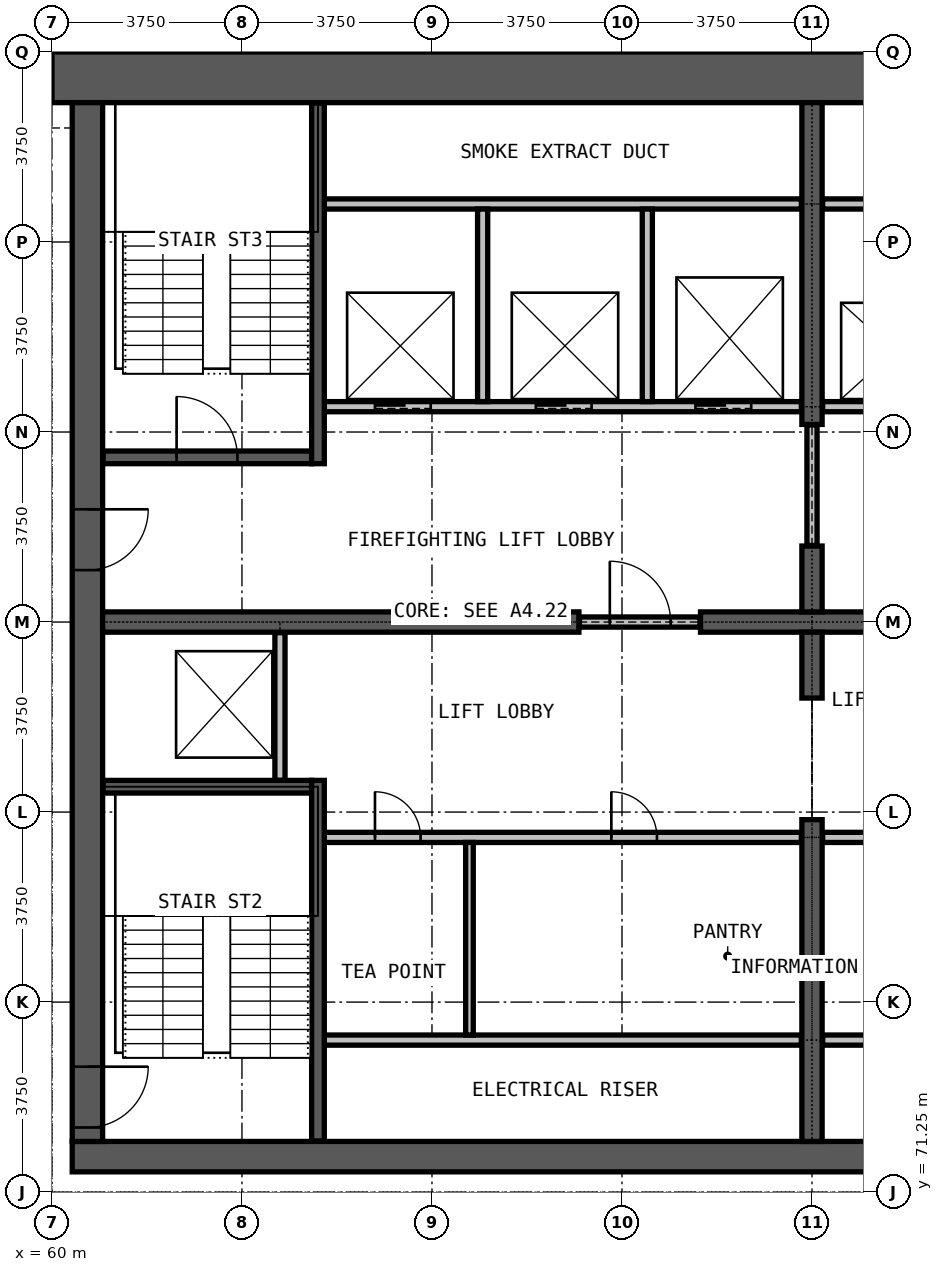
"""IFC4 building model, lengths in metres.
Left out: names, types, materials, properties, quantities, classifications, styles, units other than length and angle.
Written with IfcOpenShell. Run it as: python <this file> out.ifc"""

import sys

from ifc_helpers import new_model, si_unit, direction, frame, frame_2d, origin, place, context, subcontext, project, spatial, rectangle, extrude, element, fill, save


model = new_model("IFC4")
c1 = context("Model", 3, precision=1e-05, world=origin(), true_north=direction((0.0, 1.0)))
c2 = subcontext(c1, "Body", "Model", "MODEL_VIEW")
j1 = project(units=[si_unit("LENGTHUNIT", "METRE"), si_unit("PLANEANGLEUNIT", "RADIAN")], contexts=[c1])
p1 = place(None, origin())
s1 = spatial("IfcSite", under=j1, at=p1, CompositionType="ELEMENT")
p2 = place(p1, origin())
s2 = spatial("IfcBuilding", under=s1, at=p2, CompositionType="ELEMENT")
p3 = place(p2, frame((0.0, 0.0, 228.3)))
s3 = spatial("IfcBuildingStorey", under=s2, at=p3, CompositionType="ELEMENT", Elevation=228.3)
p4 = place(p3, frame((60.4, 71.95, 0.0), z_axis=(0.0, 0.0, 1.0), x_axis=(1.0, 0.0, 0.0)))
e1 = element("IfcWall", 1, at=p4, inside=s3, PredefinedType="SHEAR", context=c2, shape_type="SweptSolid", body=[
    extrude(rectangle(XDim=29.2, YDim=0.6, at=frame_2d((14.6, 0.0))), origin(), (0.0, 0.0, 1.0), 3.6),
])
p5 = place(p3, frame((90.0, 93.25, 0.0), z_axis=(0.0, 0.0, 1.0), x_axis=(-1.0, 0.0, 0.0)))
e2 = element("IfcWall", 2, at=p5, inside=s3, PredefinedType="SHEAR", context=c2, shape_type="SweptSolid", body=[
    extrude(rectangle(XDim=30.0, YDim=1.0, at=frame_2d((15.0, 0.0))), origin(), (0.0, 0.0, 1.0), 3.6),
])
p6 = place(p3, frame((60.7, 92.75, 0.0), z_axis=(0.0, 0.0, 1.0), x_axis=(0.0, -1.0, 0.0)))
e3 = element("IfcWall", 3, at=p6, inside=s3, PredefinedType="SHEAR", context=c2, shape_type="SweptSolid", body=[
    extrude(rectangle(XDim=20.5, YDim=0.6, at=frame_2d((10.25, 0.0))), origin(), (0.0, 0.0, 1.0), 3.6),
])
p7 = place(p6, frame((19.025, 0.0, 0.0)))
e4 = element("IfcOpeningElement", 4, at=p7, cuts=e3, PredefinedType="OPENING", context=c2, shape_type="SweptSolid", body=[
    extrude(rectangle(XDim=1.2, YDim=2.2, at=frame_2d((0.6, 1.1))), frame((0.0, 0.31, 0.0), z_axis=(0.0, -1.0, 0.0), x_axis=(1.0, 0.0, 0.0)), (0.0, 0.0, 1.0), 0.62),
])
p8 = place(p6, frame((8.025, 0.0, 0.0)))
e5 = element("IfcOpeningElement", 5, at=p8, cuts=e3, PredefinedType="OPENING", context=c2, shape_type="SweptSolid", body=[
    extrude(rectangle(XDim=1.2, YDim=2.2, at=frame_2d((0.6, 1.1))), frame((0.0, 0.31, 0.0), z_axis=(0.0, -1.0, 0.0), x_axis=(1.0, 0.0, 0.0)), (0.0, 0.0, 1.0), 0.62),
])
p9 = place(p3, frame((61.0, 82.5, 0.0), z_axis=(0.0, 0.0, 1.0), x_axis=(1.0, 0.0, 0.0)))
e6 = element("IfcWall", 6, at=p9, inside=s3, PredefinedType="SHEAR", context=c2, shape_type="SweptSolid", body=[
    extrude(rectangle(XDim=9.4, YDim=0.4, at=frame_2d((4.7, 0.0))), origin(), (0.0, 0.0, 1.0), 3.6),
])
p10 = place(p3, frame((72.8, 82.5, 0.0), z_axis=(0.0, 0.0, 1.0), x_axis=(1.0, 0.0, 0.0)))
e7 = element("IfcWall", 7, at=p10, inside=s3, PredefinedType="SHEAR", context=c2, shape_type="SweptSolid", body=[
    extrude(rectangle(XDim=4.4, YDim=0.4, at=frame_2d((2.2, 0.0))), origin(), (0.0, 0.0, 1.0), 3.6),
])
p11 = place(p3, frame((75.0, 72.25, 0.0), z_axis=(0.0, 0.0, 1.0), x_axis=(0.0, 1.0, 0.0)))
e8 = element("IfcWall", 8, at=p11, inside=s3, PredefinedType="SHEAR", context=c2, shape_type="SweptSolid", body=[
    extrude(rectangle(XDim=6.35, YDim=0.4, at=frame_2d((3.175, 0.0))), origin(), (0.0, 0.0, 1.0), 3.6),
])
for number, where, z_axis, x_axis in (
    (9, (75.0, 81.0, 0.0), (0.0, 0.0, 1.0), (0.0, 1.0, 0.0)),
    (10, (75.0, 82.7, 0.0), (0.0, 0.0, 1.0), (0.0, 1.0, 0.0)),
):
    element("IfcWall", number, at=place(p3, frame(where, z_axis=z_axis, x_axis=x_axis)), inside=s3, PredefinedType="SHEAR", context=c2, shape_type="SweptSolid", body=[
        extrude(rectangle(XDim=1.3, YDim=0.4, at=frame_2d((0.65, 0.0))), origin(), (0.0, 0.0, 1.0), 3.6),
    ])
p12 = place(p3, frame((75.0, 86.4, 0.0), z_axis=(0.0, 0.0, 1.0), x_axis=(0.0, 1.0, 0.0)))
e11 = element("IfcWall", 11, at=p12, inside=s3, PredefinedType="SHEAR", context=c2, shape_type="SweptSolid", body=[
    extrude(rectangle(XDim=6.35, YDim=0.4, at=frame_2d((3.175, 0.0))), origin(), (0.0, 0.0, 1.0), 3.6),
])
for number, where, z_axis, x_axis in (
    (12, (65.375, 74.25, 0.0), (0.0, 0.0, 1.0), (1.0, 0.0, 0.0)),
    (13, (75.21, 74.25, 0.0), (0.0, 0.0, 1.0), (1.0, 0.0, 0.0)),
):
    element("IfcWall", number, at=place(p3, frame(where, z_axis=z_axis, x_axis=x_axis)), inside=s3, PredefinedType="PARTITIONING", context=c2, shape_type="SweptSolid", body=[
        extrude(rectangle(XDim=9.415, YDim=0.2, at=frame_2d((4.708, 0.0))), origin(), (0.0, 0.0, 1.0), 3.3),
    ])
p13 = place(p3, frame((65.375, 78.25, 0.0), z_axis=(0.0, 0.0, 1.0), x_axis=(1.0, 0.0, 0.0)))
e14 = element("IfcWall", 14, at=p13, inside=s3, PredefinedType="PARTITIONING", context=c2, shape_type="SweptSolid", body=[
    extrude(rectangle(XDim=9.415, YDim=0.2, at=frame_2d((4.708, 0.0))), origin(), (0.0, 0.0, 1.0), 3.3),
])
p14 = place(p13, frame((1.0, 0.0, 0.0)))
e15 = element("IfcOpeningElement", 15, at=p14, cuts=e14, PredefinedType="OPENING", context=c2, shape_type="SweptSolid", body=[
    extrude(rectangle(XDim=0.9, YDim=2.2, at=frame_2d((0.45, 1.1))), frame((0.0, 0.11, 0.0), z_axis=(0.0, -1.0, 0.0), x_axis=(1.0, 0.0, 0.0)), (0.0, 0.0, 1.0), 0.22),
])
p15 = place(p13, frame((5.665, 0.0, 0.0)))
e16 = element("IfcOpeningElement", 16, at=p15, cuts=e14, PredefinedType="OPENING", context=c2, shape_type="SweptSolid", body=[
    extrude(rectangle(XDim=0.9, YDim=2.2, at=frame_2d((0.45, 1.1))), frame((0.0, 0.11, 0.0), z_axis=(0.0, -1.0, 0.0), x_axis=(1.0, 0.0, 0.0)), (0.0, 0.0, 1.0), 0.22),
])
p16 = place(p3, frame((75.21, 78.25, 0.0), z_axis=(0.0, 0.0, 1.0), x_axis=(1.0, 0.0, 0.0)))
e17 = element("IfcWall", 17, at=p16, inside=s3, PredefinedType="PARTITIONING", context=c2, shape_type="SweptSolid", body=[
    extrude(rectangle(XDim=9.415, YDim=0.2, at=frame_2d((4.708, 0.0))), origin(), (0.0, 0.0, 1.0), 3.3),
])
p17 = place(p16, frame((1.9, 0.0, 0.0)))
e18 = element("IfcOpeningElement", 18, at=p17, cuts=e17, PredefinedType="OPENING", context=c2, shape_type="SweptSolid", body=[
    extrude(rectangle(XDim=0.9, YDim=2.2, at=frame_2d((0.45, 1.1))), frame((0.0, 0.11, 0.0), z_axis=(0.0, -1.0, 0.0), x_axis=(1.0, 0.0, 0.0)), (0.0, 0.0, 1.0), 0.22),
])
p18 = place(p16, frame((6.565, 0.0, 0.0)))
e19 = element("IfcOpeningElement", 19, at=p18, cuts=e17, PredefinedType="OPENING", context=c2, shape_type="SweptSolid", body=[
    extrude(rectangle(XDim=0.9, YDim=2.2, at=frame_2d((0.45, 1.1))), frame((0.0, 0.11, 0.0), z_axis=(0.0, -1.0, 0.0), x_axis=(1.0, 0.0, 0.0)), (0.0, 0.0, 1.0), 0.22),
])
p19 = place(p3, frame((70.41, 82.5, 0.0), z_axis=(0.0, 0.0, 1.0), x_axis=(1.0, 0.0, 0.0)))
e20 = element("IfcWall", 20, at=p19, inside=s3, PredefinedType="PARTITIONING", context=c2, shape_type="SweptSolid", body=[
    extrude(rectangle(XDim=2.38, YDim=0.2, at=frame_2d((1.19, 0.0))), origin(), (0.0, 0.0, 1.0), 2.4),
])
p20 = place(p19, frame((0.6, 0.0, 0.0)))
e21 = element("IfcOpeningElement", 21, at=p20, cuts=e20, PredefinedType="OPENING", context=c2, shape_type="SweptSolid", body=[
    extrude(rectangle(XDim=1.2, YDim=2.2, at=frame_2d((0.6, 1.1))), frame((0.0, 0.11, 0.0), z_axis=(0.0, -1.0, 0.0), x_axis=(1.0, 0.0, 0.0)), (0.0, 0.0, 1.0), 0.22),
])
p21 = place(p3, frame((75.0, 84.01, 0.0), z_axis=(0.0, 0.0, 1.0), x_axis=(0.0, 1.0, 0.0)))
e22 = element("IfcWall", 22, at=p21, inside=s3, PredefinedType="PARTITIONING", context=c2, shape_type="SweptSolid", body=[
    extrude(rectangle(XDim=2.38, YDim=0.2, at=frame_2d((1.19, 0.0))), origin(), (0.0, 0.0, 1.0), 2.4),
])
p22 = place(p3, frame((68.24, 74.35, 0.0), z_axis=(0.0, 0.0, 1.0), x_axis=(0.0, 1.0, 0.0)))
e23 = element("IfcWall", 23, at=p22, inside=s3, PredefinedType="PARTITIONING", context=c2, shape_type="SweptSolid", body=[
    extrude(rectangle(XDim=3.8, YDim=0.15, at=frame_2d((1.9, 0.0))), origin(), (0.0, 0.0, 1.0), 3.3),
])
p23 = place(p3, frame((65.375, 86.75, 0.0), z_axis=(0.0, 0.0, 1.0), x_axis=(1.0, 0.0, 0.0)))
e24 = element("IfcWall", 24, at=p23, inside=s3, PredefinedType="PARTITIONING", context=c2, shape_type="SweptSolid", body=[
    extrude(rectangle(XDim=9.415, YDim=0.2, at=frame_2d((4.708, 0.0))), origin(), (0.0, 0.0, 1.0), 3.3),
])
p24 = place(p23, frame((1.0, 0.0, 0.0)))
e25 = element("IfcOpeningElement", 25, at=p24, cuts=e24, PredefinedType="OPENING", context=c2, shape_type="SweptSolid", body=[
    extrude(rectangle(XDim=1.1, YDim=2.2, at=frame_2d((0.55, 1.1))), frame((0.0, 0.11, 0.0), z_axis=(0.0, -1.0, 0.0), x_axis=(1.0, 0.0, 0.0)), (0.0, 0.0, 1.0), 0.22),
])
p25 = place(p23, frame((4.175, 0.0, 0.0)))
e26 = element("IfcOpeningElement", 26, at=p25, cuts=e24, PredefinedType="OPENING", context=c2, shape_type="SweptSolid", body=[
    extrude(rectangle(XDim=1.1, YDim=2.2, at=frame_2d((0.55, 1.1))), frame((0.0, 0.11, 0.0), z_axis=(0.0, -1.0, 0.0), x_axis=(1.0, 0.0, 0.0)), (0.0, 0.0, 1.0), 0.22),
])
p26 = place(p23, frame((7.325, 0.0, 0.0)))
e27 = element("IfcOpeningElement", 27, at=p26, cuts=e24, PredefinedType="OPENING", context=c2, shape_type="SweptSolid", body=[
    extrude(rectangle(XDim=1.1, YDim=2.2, at=frame_2d((0.55, 1.1))), frame((0.0, 0.11, 0.0), z_axis=(0.0, -1.0, 0.0), x_axis=(1.0, 0.0, 0.0)), (0.0, 0.0, 1.0), 0.22),
])
p27 = place(p3, frame((75.21, 86.75, 0.0), z_axis=(0.0, 0.0, 1.0), x_axis=(1.0, 0.0, 0.0)))
e28 = element("IfcWall", 28, at=p27, inside=s3, PredefinedType="PARTITIONING", context=c2, shape_type="SweptSolid", body=[
    extrude(rectangle(XDim=9.415, YDim=0.2, at=frame_2d((4.708, 0.0))), origin(), (0.0, 0.0, 1.0), 3.3),
])
p28 = place(p27, frame((0.95, 0.0, 0.0)))
e29 = element("IfcOpeningElement", 29, at=p28, cuts=e28, PredefinedType="OPENING", context=c2, shape_type="SweptSolid", body=[
    extrude(rectangle(XDim=1.1, YDim=2.2, at=frame_2d((0.55, 1.1))), frame((0.0, 0.11, 0.0), z_axis=(0.0, -1.0, 0.0), x_axis=(1.0, 0.0, 0.0)), (0.0, 0.0, 1.0), 0.22),
])
p29 = place(p27, frame((4.14, 0.0, 0.0)))
e30 = element("IfcOpeningElement", 30, at=p29, cuts=e28, PredefinedType="OPENING", context=c2, shape_type="SweptSolid", body=[
    extrude(rectangle(XDim=1.1, YDim=2.2, at=frame_2d((0.55, 1.1))), frame((0.0, 0.11, 0.0), z_axis=(0.0, -1.0, 0.0), x_axis=(1.0, 0.0, 0.0)), (0.0, 0.0, 1.0), 0.22),
])
p30 = place(p27, frame((7.29, 0.0, 0.0)))
e31 = element("IfcOpeningElement", 31, at=p30, cuts=e28, PredefinedType="OPENING", context=c2, shape_type="SweptSolid", body=[
    extrude(rectangle(XDim=1.1, YDim=2.2, at=frame_2d((0.55, 1.1))), frame((0.0, 0.11, 0.0), z_axis=(0.0, -1.0, 0.0), x_axis=(1.0, 0.0, 0.0)), (0.0, 0.0, 1.0), 0.22),
])
for number, where, z_axis, x_axis in (
    (32, (65.375, 90.75, 0.0), (0.0, 0.0, 1.0), (1.0, 0.0, 0.0)),
    (33, (75.21, 90.75, 0.0), (0.0, 0.0, 1.0), (1.0, 0.0, 0.0)),
):
    element("IfcWall", number, at=place(p3, frame(where, z_axis=z_axis, x_axis=x_axis)), inside=s3, PredefinedType="PARTITIONING", context=c2, shape_type="SweptSolid", body=[
        extrude(rectangle(XDim=9.415, YDim=0.2, at=frame_2d((4.708, 0.0))), origin(), (0.0, 0.0, 1.0), 3.3),
    ])
p31 = place(p3, frame((64.5, 79.375, 0.0), z_axis=(0.0, 0.0, 1.0), x_axis=(0.0, 1.0, 0.0)))
e34 = element("IfcWall", 34, at=p31, inside=s3, PredefinedType="PARTITIONING", context=c2, shape_type="SweptSolid", body=[
    extrude(rectangle(XDim=2.915, YDim=0.2, at=frame_2d((1.458, 0.0))), origin(), (0.0, 0.0, 1.0), 3.3),
])
for number, where, z_axis, x_axis in (
    (35, (68.5, 86.85, 0.0), (0.0, 0.0, 1.0), (0.0, 1.0, 0.0)),
    (36, (71.75, 86.85, 0.0), (0.0, 0.0, 1.0), (0.0, 1.0, 0.0)),
):
    element("IfcWall", number, at=place(p3, frame(where, z_axis=z_axis, x_axis=x_axis)), inside=s3, PredefinedType="PARTITIONING", context=c2, shape_type="SweptSolid", body=[
        extrude(rectangle(XDim=3.8, YDim=0.2, at=frame_2d((1.9, 0.0))), origin(), (0.0, 0.0, 1.0), 3.3),
    ])
p32 = place(p3, frame((61.01, 79.25, 0.0), z_axis=(0.0, 0.0, 1.0), x_axis=(1.0, 0.0, 0.0)))
e37 = element("IfcWall", 37, at=p32, inside=s3, PredefinedType="PARTITIONING", context=c2, shape_type="SweptSolid", body=[
    extrude(rectangle(XDim=4.115, YDim=0.25, at=frame_2d((2.058, 0.0))), origin(), (0.0, 0.0, 1.0), 3.3),
])
p33 = place(p3, frame((61.01, 85.75, 0.0), z_axis=(0.0, 0.0, 1.0), x_axis=(1.0, 0.0, 0.0)))
e38 = element("IfcWall", 38, at=p33, inside=s3, PredefinedType="PARTITIONING", context=c2, shape_type="SweptSolid", body=[
    extrude(rectangle(XDim=4.115, YDim=0.25, at=frame_2d((2.058, 0.0))), origin(), (0.0, 0.0, 1.0), 3.3),
])
p34 = place(p33, frame((1.45, 0.0, 0.0)))
e39 = element("IfcOpeningElement", 39, at=p34, cuts=e38, PredefinedType="OPENING", context=c2, shape_type="SweptSolid", body=[
    extrude(rectangle(XDim=1.2, YDim=2.2, at=frame_2d((0.6, 1.1))), frame((0.0, 0.135, 0.0), z_axis=(0.0, -1.0, 0.0), x_axis=(1.0, 0.0, 0.0)), (0.0, 0.0, 1.0), 0.27),
])
for number, where, z_axis, x_axis in (
    (40, (65.25, 72.26, 0.0), (0.0, 0.0, 1.0), (0.0, 1.0, 0.0)),
    (41, (65.25, 85.625, 0.0), (0.0, 0.0, 1.0), (0.0, 1.0, 0.0)),
):
    element("IfcWall", number, at=place(p3, frame(where, z_axis=z_axis, x_axis=x_axis)), inside=s3, PredefinedType="PARTITIONING", context=c2, shape_type="SweptSolid", body=[
        extrude(rectangle(XDim=7.115, YDim=0.25, at=frame_2d((3.558, 0.0))), origin(), (0.0, 0.0, 1.0), 3.3),
    ])
p35 = place(p24, origin())
e42 = element("IfcDoor", 42, at=p35, inside=s3, OperationType="DOUBLE_DOOR_SLIDING", PredefinedType="DOOR", context=c2, shape_type="SweptSolid", body=[
    extrude(rectangle(XDim=1.1, YDim=2.2, at=frame_2d((0.55, 1.1))), frame((0.0, 0.025, 0.0), z_axis=(0.0, -1.0, 0.0), x_axis=(1.0, 0.0, 0.0)), (0.0, 0.0, 1.0), 0.05),
])
fill(e25, e42)
p36 = place(p25, origin())
e43 = element("IfcDoor", 43, at=p36, inside=s3, OperationType="DOUBLE_DOOR_SLIDING", PredefinedType="DOOR", context=c2, shape_type="SweptSolid", body=[
    extrude(rectangle(XDim=1.1, YDim=2.2, at=frame_2d((0.55, 1.1))), frame((0.0, 0.025, 0.0), z_axis=(0.0, -1.0, 0.0), x_axis=(1.0, 0.0, 0.0)), (0.0, 0.0, 1.0), 0.05),
])
fill(e26, e43)
p37 = place(p26, origin())
e44 = element("IfcDoor", 44, at=p37, inside=s3, OperationType="DOUBLE_DOOR_SLIDING", PredefinedType="DOOR", context=c2, shape_type="SweptSolid", body=[
    extrude(rectangle(XDim=1.1, YDim=2.2, at=frame_2d((0.55, 1.1))), frame((0.0, 0.025, 0.0), z_axis=(0.0, -1.0, 0.0), x_axis=(1.0, 0.0, 0.0)), (0.0, 0.0, 1.0), 0.05),
])
fill(e27, e44)
p38 = place(p20, origin())
e45 = element("IfcDoor", 45, at=p38, inside=s3, OperationType="SINGLE_SWING_RIGHT", PredefinedType="DOOR", context=c2, shape_type="SweptSolid", body=[
    extrude(rectangle(XDim=1.2, YDim=2.2, at=frame_2d((0.6, 1.1))), frame((0.0, 0.025, 0.0), z_axis=(0.0, -1.0, 0.0), x_axis=(1.0, 0.0, 0.0)), (0.0, 0.0, 1.0), 0.05),
])
fill(e21, e45)
p39 = place(p34, origin())
e46 = element("IfcDoor", 46, at=p39, inside=s3, OperationType="SINGLE_SWING_LEFT", PredefinedType="DOOR", context=c2, shape_type="SweptSolid", body=[
    extrude(rectangle(XDim=1.2, YDim=2.2, at=frame_2d((0.6, 1.1))), frame((0.0, 0.025, 0.0), z_axis=(0.0, -1.0, 0.0), x_axis=(1.0, 0.0, 0.0)), (0.0, 0.0, 1.0), 0.05),
])
fill(e39, e46)
p40 = place(p7, origin())
e47 = element("IfcDoor", 47, at=p40, inside=s3, OperationType="SINGLE_SWING_LEFT", PredefinedType="DOOR", context=c2, shape_type="SweptSolid", body=[
    extrude(rectangle(XDim=1.2, YDim=2.2, at=frame_2d((0.6, 1.1))), frame((0.0, 0.025, 0.0), z_axis=(0.0, -1.0, 0.0), x_axis=(1.0, 0.0, 0.0)), (0.0, 0.0, 1.0), 0.05),
])
fill(e4, e47)
p41 = place(p8, origin())
e48 = element("IfcDoor", 48, at=p41, inside=s3, OperationType="SINGLE_SWING_LEFT", PredefinedType="DOOR", context=c2, shape_type="SweptSolid", body=[
    extrude(rectangle(XDim=1.2, YDim=2.2, at=frame_2d((0.6, 1.1))), frame((0.0, 0.025, 0.0), z_axis=(0.0, -1.0, 0.0), x_axis=(1.0, 0.0, 0.0)), (0.0, 0.0, 1.0), 0.05),
])
fill(e5, e48)
p42 = place(p14, origin())
e49 = element("IfcDoor", 49, at=p42, inside=s3, OperationType="SINGLE_SWING_LEFT", PredefinedType="DOOR", context=c2, shape_type="SweptSolid", body=[
    extrude(rectangle(XDim=0.9, YDim=2.2, at=frame_2d((0.45, 1.1))), frame((0.0, 0.025, 0.0), z_axis=(0.0, -1.0, 0.0), x_axis=(1.0, 0.0, 0.0)), (0.0, 0.0, 1.0), 0.05),
])
fill(e15, e49)
p43 = place(p15, origin())
e50 = element("IfcDoor", 50, at=p43, inside=s3, OperationType="SINGLE_SWING_LEFT", PredefinedType="DOOR", context=c2, shape_type="SweptSolid", body=[
    extrude(rectangle(XDim=0.9, YDim=2.2, at=frame_2d((0.45, 1.1))), frame((0.0, 0.025, 0.0), z_axis=(0.0, -1.0, 0.0), x_axis=(1.0, 0.0, 0.0)), (0.0, 0.0, 1.0), 0.05),
])
fill(e16, e50)
save(model, sys.argv[1])
